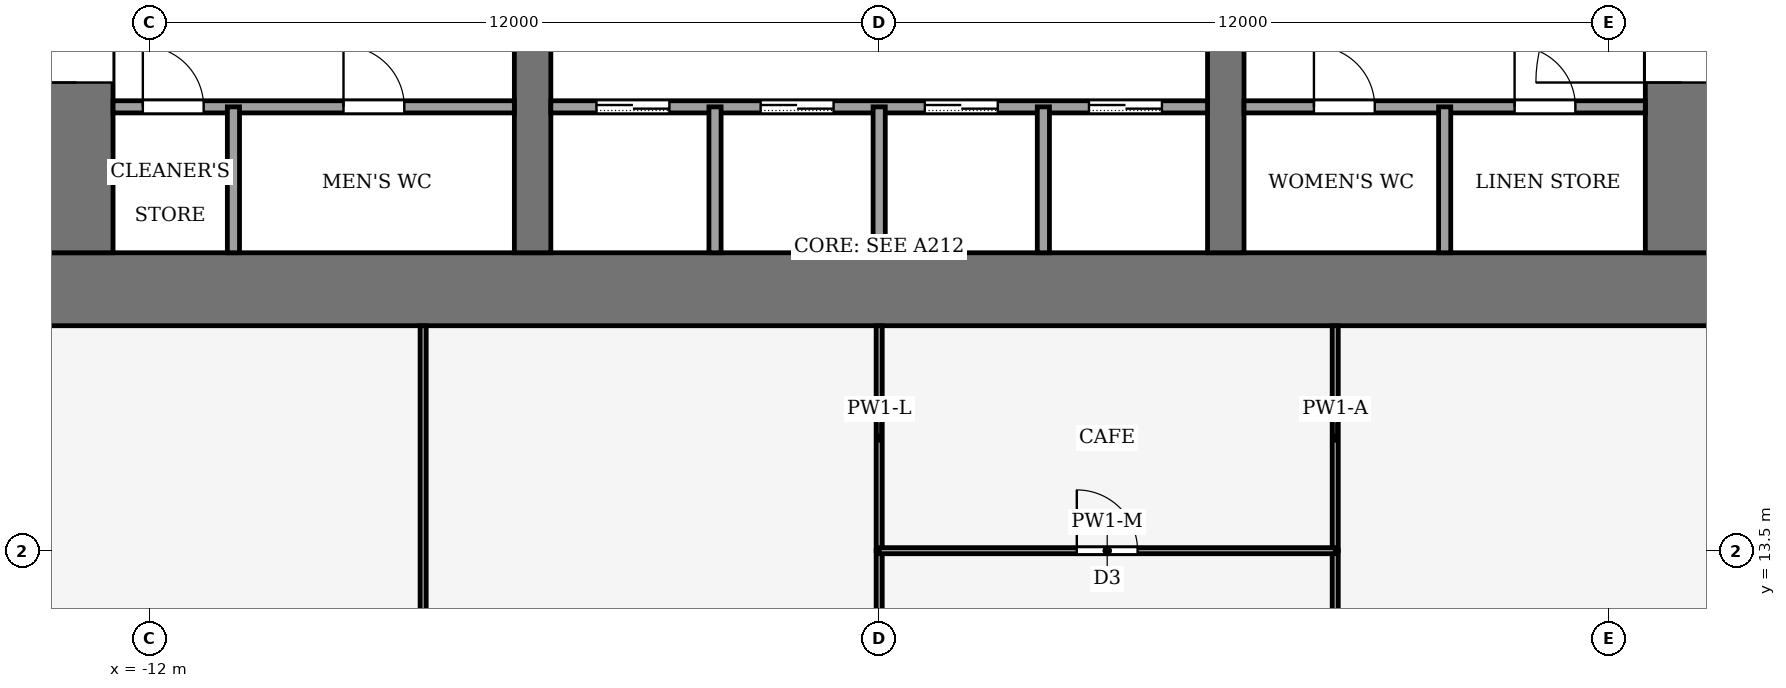
"""IFC4 building model, lengths in metres.
Left out: names, types, materials, properties, quantities, classifications, styles, units other than length and angle.
Written with IfcOpenShell. Run it as: python <this file> out.ifc"""

import sys

from ifc_helpers import new_model, si_unit, direction, frame, frame_2d, origin, place, context, subcontext, project, spatial, rectangle, extrude, element, fill, save


model = new_model("IFC4")
c1 = context("Model", 3, precision=1e-05, world=origin(), true_north=direction((0.0, 1.0)))
c2 = subcontext(c1, "Body", "Model", "MODEL_VIEW")
j1 = project(units=[si_unit("LENGTHUNIT", "METRE"), si_unit("PLANEANGLEUNIT", "RADIAN")], contexts=[c1])
p1 = place(None, origin())
s1 = spatial("IfcSite", under=j1, at=p1, CompositionType="ELEMENT")
p2 = place(p1, origin())
s2 = spatial("IfcBuilding", under=s1, at=p2, CompositionType="ELEMENT")
p3 = place(p2, frame((0.0, 0.0, 65.0)))
s3 = spatial("IfcBuildingStorey", under=s2, at=p3, CompositionType="ELEMENT", Elevation=65.0)
p4 = place(p3, frame((-13.8, 17.8, -0.13), z_axis=(0.0, 0.0, 1.0), x_axis=(1.0, 0.0, 0.0)))
e1 = element("IfcWall", 1, at=p4, inside=s3, PredefinedType="SHEAR", context=c2, shape_type="SweptSolid", body=[
    extrude(rectangle(XDim=27.6, YDim=1.2, at=frame_2d((13.8, 0.0))), origin(), (0.0, 0.0, 1.0), 5.0),
])
p5 = place(p3, frame((-13.2, 18.4, -0.13), z_axis=(0.0, 0.0, 1.0), x_axis=(0.0, 1.0, 0.0)))
e2 = element("IfcWall", 2, at=p5, inside=s3, PredefinedType="SHEAR", context=c2, shape_type="SweptSolid", body=[
    extrude(rectangle(XDim=19.2, YDim=1.2, at=frame_2d((9.6, 0.0))), origin(), (0.0, 0.0, 1.0), 5.0),
])
p6 = place(p5, frame((2.8, 0.0, 0.13)))
e3 = element("IfcOpeningElement", 3, at=p6, cuts=e2, PredefinedType="OPENING", context=c2, shape_type="SweptSolid", body=[
    extrude(rectangle(XDim=2.4, YDim=2.4, at=frame_2d((1.2, 1.2))), frame((0.0, 0.61, 0.0), z_axis=(0.0, -1.0, 0.0), x_axis=(1.0, 0.0, 0.0)), (0.0, 0.0, 1.0), 1.22),
])
p7 = place(p5, frame((13.4, 0.0, 0.13)))
e4 = element("IfcOpeningElement", 4, at=p7, cuts=e2, PredefinedType="OPENING", context=c2, shape_type="SweptSolid", body=[
    extrude(rectangle(XDim=1.4, YDim=2.2, at=frame_2d((0.7, 1.1))), frame((0.0, 0.61, 0.0), z_axis=(0.0, -1.0, 0.0), x_axis=(1.0, 0.0, 0.0)), (0.0, 0.0, 1.0), 1.22),
])
p8 = place(p3, frame((13.2, 18.4, -0.13), z_axis=(0.0, 0.0, 1.0), x_axis=(0.0, 1.0, 0.0)))
e5 = element("IfcWall", 5, at=p8, inside=s3, PredefinedType="SHEAR", context=c2, shape_type="SweptSolid", body=[
    extrude(rectangle(XDim=19.2, YDim=1.2, at=frame_2d((9.6, 0.0))), origin(), (0.0, 0.0, 1.0), 5.0),
])
p9 = place(p8, frame((2.8, 0.0, 0.13)))
e6 = element("IfcOpeningElement", 6, at=p9, cuts=e5, PredefinedType="OPENING", context=c2, shape_type="SweptSolid", body=[
    extrude(rectangle(XDim=2.4, YDim=2.4, at=frame_2d((1.2, 1.2))), frame((0.0, 0.61, 0.0), z_axis=(0.0, -1.0, 0.0), x_axis=(1.0, 0.0, 0.0)), (0.0, 0.0, 1.0), 1.22),
])
p10 = place(p8, frame((13.3, 0.0, 0.13)))
e7 = element("IfcOpeningElement", 7, at=p10, cuts=e5, PredefinedType="OPENING", context=c2, shape_type="SweptSolid", body=[
    extrude(rectangle(XDim=2.4, YDim=2.4, at=frame_2d((1.2, 1.2))), frame((0.0, 0.61, 0.0), z_axis=(0.0, -1.0, 0.0), x_axis=(1.0, 0.0, 0.0)), (0.0, 0.0, 1.0), 1.22),
])
p11 = place(p3, frame((-5.7, 18.4, -0.13), z_axis=(0.0, 0.0, 1.0), x_axis=(0.0, 1.0, 0.0)))
e8 = element("IfcWall", 8, at=p11, inside=s3, PredefinedType="SHEAR", context=c2, shape_type="SweptSolid", body=[
    extrude(rectangle(XDim=19.2, YDim=0.6, at=frame_2d((9.6, 0.0))), origin(), (0.0, 0.0, 1.0), 5.0),
])
p12 = place(p11, frame((8.35, 0.0, 0.13)))
e9 = element("IfcOpeningElement", 9, at=p12, cuts=e8, PredefinedType="OPENING", context=c2, shape_type="SweptSolid", body=[
    extrude(rectangle(XDim=0.9, YDim=2.1, at=frame_2d((0.45, 1.05))), frame((0.0, 0.31, 0.0), z_axis=(0.0, -1.0, 0.0), x_axis=(1.0, 0.0, 0.0)), (0.0, 0.0, 1.0), 0.62),
])
p13 = place(p3, frame((5.7, 18.4, -0.13), z_axis=(0.0, 0.0, 1.0), x_axis=(0.0, 1.0, 0.0)))
e10 = element("IfcWall", 10, at=p13, inside=s3, PredefinedType="SHEAR", context=c2, shape_type="SweptSolid", body=[
    extrude(rectangle(XDim=19.2, YDim=0.6, at=frame_2d((9.6, 0.0))), origin(), (0.0, 0.0, 1.0), 5.0),
])
p14 = place(p13, frame((13.3, 0.0, 0.13)))
e11 = element("IfcOpeningElement", 11, at=p14, cuts=e10, PredefinedType="OPENING", context=c2, shape_type="SweptSolid", body=[
    extrude(rectangle(XDim=2.4, YDim=2.4, at=frame_2d((1.2, 1.2))), frame((0.0, 0.31, 0.0), z_axis=(0.0, -1.0, 0.0), x_axis=(1.0, 0.0, 0.0)), (0.0, 0.0, 1.0), 0.62),
])
p15 = place(p3, frame((-12.6, 20.8, 0.0), z_axis=(0.0, 0.0, 1.0), x_axis=(1.0, 0.0, 0.0)))
e12 = element("IfcWall", 12, at=p15, inside=s3, PredefinedType="PARTITIONING", context=c2, shape_type="SweptSolid", body=[
    extrude(rectangle(XDim=6.6, YDim=0.2, at=frame_2d((3.3, 0.0))), origin(), (0.0, 0.0, 1.0), 4.87),
])
p16 = place(p15, frame((0.49, 0.0, 0.0)))
e13 = element("IfcOpeningElement", 13, at=p16, cuts=e12, PredefinedType="OPENING", context=c2, shape_type="SweptSolid", body=[
    extrude(rectangle(XDim=1.0, YDim=2.1, at=frame_2d((0.5, 1.05))), frame((0.0, 0.11, 0.0), z_axis=(0.0, -1.0, 0.0), x_axis=(1.0, 0.0, 0.0)), (0.0, 0.0, 1.0), 0.22),
])
p17 = place(p15, frame((3.79, 0.0, 0.0)))
e14 = element("IfcOpeningElement", 14, at=p17, cuts=e12, PredefinedType="OPENING", context=c2, shape_type="SweptSolid", body=[
    extrude(rectangle(XDim=1.0, YDim=2.1, at=frame_2d((0.5, 1.05))), frame((0.0, 0.11, 0.0), z_axis=(0.0, -1.0, 0.0), x_axis=(1.0, 0.0, 0.0)), (0.0, 0.0, 1.0), 0.22),
])
p18 = place(p3, frame((-5.4, 20.8, 0.0), z_axis=(0.0, 0.0, 1.0), x_axis=(1.0, 0.0, 0.0)))
e15 = element("IfcWall", 15, at=p18, inside=s3, PredefinedType="PARTITIONING", context=c2, shape_type="SweptSolid", body=[
    extrude(rectangle(XDim=10.8, YDim=0.2, at=frame_2d((5.4, 0.0))), origin(), (0.0, 0.0, 1.0), 4.87),
])
p19 = place(p18, frame((0.75, 0.0, 0.0)))
e16 = element("IfcOpeningElement", 16, at=p19, cuts=e15, PredefinedType="OPENING", context=c2, shape_type="SweptSolid", body=[
    extrude(rectangle(XDim=1.2, YDim=2.2, at=frame_2d((0.6, 1.1))), frame((0.0, 0.11, 0.0), z_axis=(0.0, -1.0, 0.0), x_axis=(1.0, 0.0, 0.0)), (0.0, 0.0, 1.0), 0.22),
])
p20 = place(p18, frame((3.45, 0.0, 0.0)))
e17 = element("IfcOpeningElement", 17, at=p20, cuts=e15, PredefinedType="OPENING", context=c2, shape_type="SweptSolid", body=[
    extrude(rectangle(XDim=1.2, YDim=2.2, at=frame_2d((0.6, 1.1))), frame((0.0, 0.11, 0.0), z_axis=(0.0, -1.0, 0.0), x_axis=(1.0, 0.0, 0.0)), (0.0, 0.0, 1.0), 0.22),
])
p21 = place(p18, frame((6.15, 0.0, 0.0)))
e18 = element("IfcOpeningElement", 18, at=p21, cuts=e15, PredefinedType="OPENING", context=c2, shape_type="SweptSolid", body=[
    extrude(rectangle(XDim=1.2, YDim=2.2, at=frame_2d((0.6, 1.1))), frame((0.0, 0.11, 0.0), z_axis=(0.0, -1.0, 0.0), x_axis=(1.0, 0.0, 0.0)), (0.0, 0.0, 1.0), 0.22),
])
p22 = place(p18, frame((8.85, 0.0, 0.0)))
e19 = element("IfcOpeningElement", 19, at=p22, cuts=e15, PredefinedType="OPENING", context=c2, shape_type="SweptSolid", body=[
    extrude(rectangle(XDim=1.2, YDim=2.2, at=frame_2d((0.6, 1.1))), frame((0.0, 0.11, 0.0), z_axis=(0.0, -1.0, 0.0), x_axis=(1.0, 0.0, 0.0)), (0.0, 0.0, 1.0), 0.22),
])
p23 = place(p3, frame((6.0, 20.8, 0.0), z_axis=(0.0, 0.0, 1.0), x_axis=(1.0, 0.0, 0.0)))
e20 = element("IfcWall", 20, at=p23, inside=s3, PredefinedType="PARTITIONING", context=c2, shape_type="SweptSolid", body=[
    extrude(rectangle(XDim=6.6, YDim=0.2, at=frame_2d((3.3, 0.0))), origin(), (0.0, 0.0, 1.0), 4.87),
])
p24 = place(p23, frame((1.15, 0.0, 0.0)))
e21 = element("IfcOpeningElement", 21, at=p24, cuts=e20, PredefinedType="OPENING", context=c2, shape_type="SweptSolid", body=[
    extrude(rectangle(XDim=1.0, YDim=2.1, at=frame_2d((0.5, 1.05))), frame((0.0, 0.11, 0.0), z_axis=(0.0, -1.0, 0.0), x_axis=(1.0, 0.0, 0.0)), (0.0, 0.0, 1.0), 0.22),
])
p25 = place(p23, frame((4.45, 0.0, 0.0)))
e22 = element("IfcOpeningElement", 22, at=p25, cuts=e20, PredefinedType="OPENING", context=c2, shape_type="SweptSolid", body=[
    extrude(rectangle(XDim=1.0, YDim=2.1, at=frame_2d((0.5, 1.05))), frame((0.0, 0.11, 0.0), z_axis=(0.0, -1.0, 0.0), x_axis=(1.0, 0.0, 0.0)), (0.0, 0.0, 1.0), 0.22),
])
for number, where, z_axis, x_axis in (
    (23, (-10.62, 18.4, 0.0), (0.0, 0.0, 1.0), (0.0, 1.0, 0.0)),
    (24, (-2.7, 18.4, 0.0), (0.0, 0.0, 1.0), (0.0, 1.0, 0.0)),
    (25, (0.0, 18.4, 0.0), (0.0, 0.0, 1.0), (0.0, 1.0, 0.0)),
    (26, (2.7, 18.4, 0.0), (0.0, 0.0, 1.0), (0.0, 1.0, 0.0)),
    (27, (9.3, 18.4, 0.0), (0.0, 0.0, 1.0), (0.0, 1.0, 0.0)),
):
    element("IfcWall", number, at=place(p3, frame(where, z_axis=z_axis, x_axis=x_axis)), inside=s3, PredefinedType="PARTITIONING", context=c2, shape_type="SweptSolid", body=[
        extrude(rectangle(XDim=2.4, YDim=0.2, at=frame_2d((1.2, 0.0))), origin(), (0.0, 0.0, 1.0), 4.87),
    ])
p26 = place(p3, frame((-7.5, 17.2, 0.0), z_axis=(0.0, 0.0, 1.0), x_axis=(0.0, -1.0, 0.0)))
e28 = element("IfcWall", 28, at=p26, inside=s3, PredefinedType="PARTITIONING", context=c2, shape_type="SweptSolid", body=[
    extrude(rectangle(XDim=11.905, YDim=0.1, at=frame_2d((5.953, 0.0))), origin(), (0.0, 0.0, 1.0), 4.04),
])
p27 = place(p26, frame((4.987, 0.0, 0.0)))
e29 = element("IfcOpeningElement", 29, at=p27, cuts=e28, PredefinedType="OPENING", context=c2, shape_type="SweptSolid", body=[
    extrude(rectangle(XDim=1.8, YDim=2.1, at=frame_2d((0.9, 1.05))), frame((0.0, 0.06, 0.0), z_axis=(0.0, -1.0, 0.0), x_axis=(1.0, 0.0, 0.0)), (0.0, 0.0, 1.0), 0.12),
])
p28 = place(p3, frame((0.0, 5.92, 0.0), z_axis=(0.0, 0.0, 1.0), x_axis=(0.0, 1.0, 0.0)))
e30 = element("IfcWall", 30, at=p28, inside=s3, PredefinedType="PARTITIONING", context=c2, shape_type="SweptSolid", body=[
    extrude(rectangle(XDim=7.58, YDim=0.1, at=frame_2d((3.79, 0.0))), origin(), (0.0, 0.0, 1.0), 4.04),
])
p29 = place(p3, frame((0.0, 13.5, 0.0), z_axis=(0.0, 0.0, 1.0), x_axis=(0.0, 1.0, 0.0)))
e31 = element("IfcWall", 31, at=p29, inside=s3, PredefinedType="PARTITIONING", context=c2, shape_type="SweptSolid", body=[
    extrude(rectangle(XDim=3.7, YDim=0.1, at=frame_2d((1.85, 0.0))), origin(), (0.0, 0.0, 1.0), 4.48),
])
p30 = place(p3, frame((7.5, 5.295, 0.0), z_axis=(0.0, 0.0, 1.0), x_axis=(0.0, 1.0, 0.0)))
e32 = element("IfcWall", 32, at=p30, inside=s3, PredefinedType="PARTITIONING", context=c2, shape_type="SweptSolid", body=[
    extrude(rectangle(XDim=8.205, YDim=0.1, at=frame_2d((4.103, 0.0))), origin(), (0.0, 0.0, 1.0), 4.04),
])
p31 = place(p30, frame((3.667, 0.0, 0.0)))
e33 = element("IfcOpeningElement", 33, at=p31, cuts=e32, PredefinedType="OPENING", context=c2, shape_type="SweptSolid", body=[
    extrude(rectangle(XDim=1.0, YDim=2.1, at=frame_2d((0.5, 1.05))), frame((0.0, 0.06, 0.0), z_axis=(0.0, -1.0, 0.0), x_axis=(1.0, 0.0, 0.0)), (0.0, 0.0, 1.0), 0.12),
])
p32 = place(p3, frame((7.5, 17.2, 0.0), z_axis=(0.0, 0.0, 1.0), x_axis=(0.0, -1.0, 0.0)))
e34 = element("IfcWall", 34, at=p32, inside=s3, PredefinedType="PARTITIONING", context=c2, shape_type="SweptSolid", body=[
    extrude(rectangle(XDim=3.7, YDim=0.1, at=frame_2d((1.85, 0.0))), origin(), (0.0, 0.0, 1.0), 4.87),
])
p33 = place(p3, frame((0.0, 13.5, 0.0), z_axis=(0.0, 0.0, 1.0), x_axis=(1.0, 0.0, 0.0)))
e35 = element("IfcWall", 35, at=p33, inside=s3, PredefinedType="PARTITIONING", context=c2, shape_type="SweptSolid", body=[
    extrude(rectangle(XDim=7.5, YDim=0.1, at=frame_2d((3.75, 0.0))), origin(), (0.0, 0.0, 1.0), 4.44),
])
p34 = place(p33, frame((3.25, 0.0, 0.0)))
e36 = element("IfcOpeningElement", 36, at=p34, cuts=e35, PredefinedType="OPENING", context=c2, shape_type="SweptSolid", body=[
    extrude(rectangle(XDim=1.0, YDim=2.1, at=frame_2d((0.5, 1.05))), frame((0.0, 0.06, 0.0), z_axis=(0.0, -1.0, 0.0), x_axis=(1.0, 0.0, 0.0)), (0.0, 0.0, 1.0), 0.12),
])
p35 = place(p19, origin())
e37 = element("IfcDoor", 37, at=p35, inside=s3, OperationType="SLIDING_TO_LEFT", PredefinedType="DOOR", context=c2, shape_type="SweptSolid", body=[
    extrude(rectangle(XDim=1.2, YDim=2.2, at=frame_2d((0.6, 1.1))), frame((0.0, 0.025, 0.0), z_axis=(0.0, -1.0, 0.0), x_axis=(1.0, 0.0, 0.0)), (0.0, 0.0, 1.0), 0.05),
])
fill(e16, e37)
p36 = place(p20, origin())
e38 = element("IfcDoor", 38, at=p36, inside=s3, OperationType="SLIDING_TO_LEFT", PredefinedType="DOOR", context=c2, shape_type="SweptSolid", body=[
    extrude(rectangle(XDim=1.2, YDim=2.2, at=frame_2d((0.6, 1.1))), frame((0.0, 0.025, 0.0), z_axis=(0.0, -1.0, 0.0), x_axis=(1.0, 0.0, 0.0)), (0.0, 0.0, 1.0), 0.05),
])
fill(e17, e38)
p37 = place(p21, origin())
e39 = element("IfcDoor", 39, at=p37, inside=s3, OperationType="SLIDING_TO_LEFT", PredefinedType="DOOR", context=c2, shape_type="SweptSolid", body=[
    extrude(rectangle(XDim=1.2, YDim=2.2, at=frame_2d((0.6, 1.1))), frame((0.0, 0.025, 0.0), z_axis=(0.0, -1.0, 0.0), x_axis=(1.0, 0.0, 0.0)), (0.0, 0.0, 1.0), 0.05),
])
fill(e18, e39)
p38 = place(p22, origin())
e40 = element("IfcDoor", 40, at=p38, inside=s3, OperationType="SLIDING_TO_LEFT", PredefinedType="DOOR", context=c2, shape_type="SweptSolid", body=[
    extrude(rectangle(XDim=1.2, YDim=2.2, at=frame_2d((0.6, 1.1))), frame((0.0, 0.025, 0.0), z_axis=(0.0, -1.0, 0.0), x_axis=(1.0, 0.0, 0.0)), (0.0, 0.0, 1.0), 0.05),
])
fill(e19, e40)
p39 = place(p16, origin())
e41 = element("IfcDoor", 41, at=p39, inside=s3, OperationType="SINGLE_SWING_RIGHT", PredefinedType="DOOR", context=c2, shape_type="SweptSolid", body=[
    extrude(rectangle(XDim=1.0, YDim=2.1, at=frame_2d((0.5, 1.05))), frame((0.0, 0.025, 0.0), z_axis=(0.0, -1.0, 0.0), x_axis=(1.0, 0.0, 0.0)), (0.0, 0.0, 1.0), 0.05),
])
fill(e13, e41)
p40 = place(p17, origin())
e42 = element("IfcDoor", 42, at=p40, inside=s3, OperationType="SINGLE_SWING_RIGHT", PredefinedType="DOOR", context=c2, shape_type="SweptSolid", body=[
    extrude(rectangle(XDim=1.0, YDim=2.1, at=frame_2d((0.5, 1.05))), frame((0.0, 0.025, 0.0), z_axis=(0.0, -1.0, 0.0), x_axis=(1.0, 0.0, 0.0)), (0.0, 0.0, 1.0), 0.05),
])
fill(e14, e42)
p41 = place(p24, origin())
e43 = element("IfcDoor", 43, at=p41, inside=s3, OperationType="SINGLE_SWING_LEFT", PredefinedType="DOOR", context=c2, shape_type="SweptSolid", body=[
    extrude(rectangle(XDim=1.0, YDim=2.1, at=frame_2d((0.5, 1.05))), frame((0.0, 0.025, 0.0), z_axis=(0.0, -1.0, 0.0), x_axis=(1.0, 0.0, 0.0)), (0.0, 0.0, 1.0), 0.05),
])
fill(e21, e43)
p42 = place(p25, origin())
e44 = element("IfcDoor", 44, at=p42, inside=s3, OperationType="SINGLE_SWING_LEFT", PredefinedType="DOOR", context=c2, shape_type="SweptSolid", body=[
    extrude(rectangle(XDim=1.0, YDim=2.1, at=frame_2d((0.5, 1.05))), frame((0.0, 0.025, 0.0), z_axis=(0.0, -1.0, 0.0), x_axis=(1.0, 0.0, 0.0)), (0.0, 0.0, 1.0), 0.05),
])
fill(e22, e44)
p43 = place(p6, origin())
e45 = element("IfcDoor", 45, at=p43, inside=s3, OperationType="DOUBLE_DOOR_SINGLE_SWING", PredefinedType="DOOR", context=c2, shape_type="SweptSolid", body=[
    extrude(rectangle(XDim=2.4, YDim=2.4, at=frame_2d((1.2, 1.2))), frame((0.0, 0.025, 0.0), z_axis=(0.0, -1.0, 0.0), x_axis=(1.0, 0.0, 0.0)), (0.0, 0.0, 1.0), 0.05),
])
fill(e3, e45)
p44 = place(p9, origin())
e46 = element("IfcDoor", 46, at=p44, inside=s3, OperationType="DOUBLE_DOOR_SINGLE_SWING", PredefinedType="DOOR", context=c2, shape_type="SweptSolid", body=[
    extrude(rectangle(XDim=2.4, YDim=2.4, at=frame_2d((1.2, 1.2))), frame((0.0, 0.025, 0.0), z_axis=(0.0, -1.0, 0.0), x_axis=(1.0, 0.0, 0.0)), (0.0, 0.0, 1.0), 0.05),
])
fill(e6, e46)
p45 = place(p34, origin())
e47 = element("IfcDoor", 47, at=p45, inside=s3, OperationType="SINGLE_SWING_LEFT", PredefinedType="DOOR", context=c2, shape_type="SweptSolid", body=[
    extrude(rectangle(XDim=1.0, YDim=2.1, at=frame_2d((0.5, 1.05))), frame((0.0, 0.025, 0.0), z_axis=(0.0, -1.0, 0.0), x_axis=(1.0, 0.0, 0.0)), (0.0, 0.0, 1.0), 0.05),
])
fill(e36, e47)
save(model, sys.argv[1])
